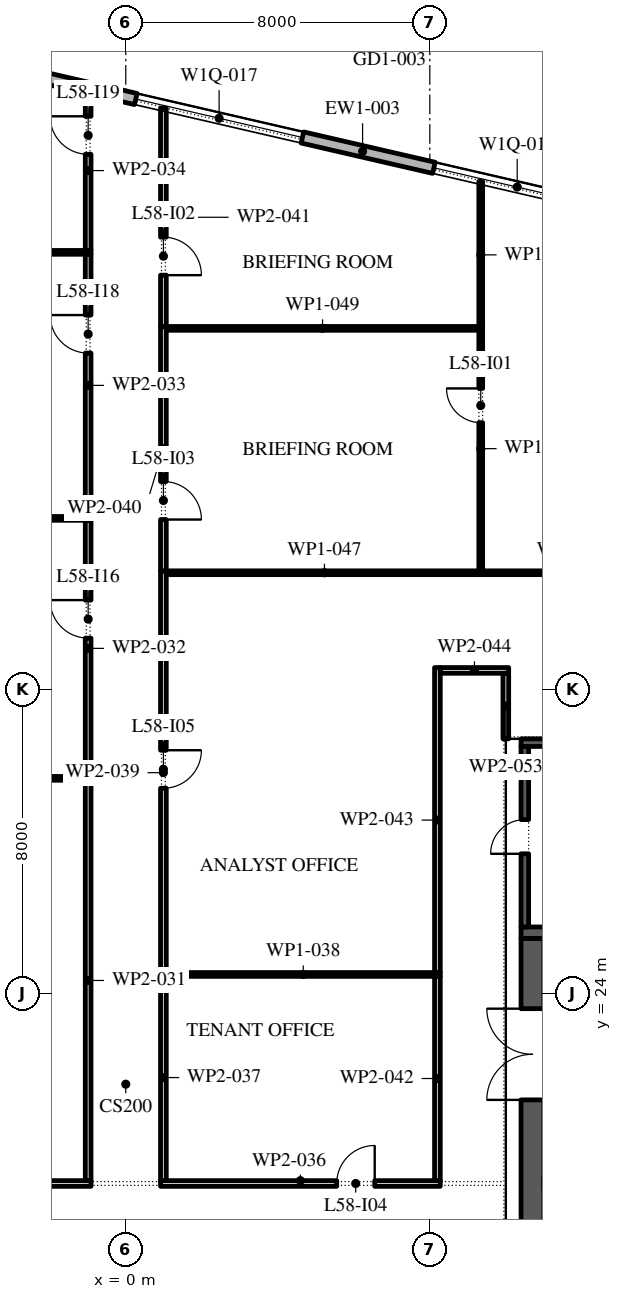
"""IFC4 building model, lengths in metres.
Left out: names, types, materials, properties, quantities, classifications, styles, units other than length and angle.
Written with IfcOpenShell. Run it as: python <this file> out.ifc"""

import sys

from ifc_helpers import new_model, si_unit, direction, frame, frame_2d, origin, place, context, subcontext, project, spatial, rectangle, extrude, element, fill, save


model = new_model("IFC4")
c1 = context("Model", 3, precision=1e-05, world=origin(), true_north=direction((0.0, 1.0)))
c2 = subcontext(c1, "Body", "Model", "MODEL_VIEW")
j1 = project(units=[si_unit("LENGTHUNIT", "METRE"), si_unit("PLANEANGLEUNIT", "RADIAN")], contexts=[c1])
p1 = place(None, origin())
s1 = spatial("IfcSite", under=j1, at=p1, CompositionType="ELEMENT")
p2 = place(p1, origin())
s2 = spatial("IfcBuilding", under=s1, at=p2, CompositionType="ELEMENT")
p3 = place(p2, frame((0.0, 0.0, 268.2)))
s3 = spatial("IfcBuildingStorey", under=s2, at=p3, CompositionType="ELEMENT", Elevation=268.2)
p4 = place(p3, frame((29.616, 40.758, 0.0), z_axis=(0.0, 0.0, 1.0), x_axis=(-0.974370532314, 0.224949029246, 0.0)))
e1 = element("IfcWall", 1, at=p4, inside=s3, PredefinedType="STANDARD", context=c2, shape_type="SweptSolid", body=[
    extrude(rectangle(XDim=48.0, YDim=0.3, at=frame_2d((24.0, 0.0))), origin(), (0.0, 0.0, 1.0), 4.0),
])
p5 = place(p4, frame((1.625, 0.0, 0.45)))
e2 = element("IfcOpeningElement", 2, at=p5, cuts=e1, PredefinedType="OPENING", context=c2, shape_type="SweptSolid", body=[
    extrude(rectangle(XDim=4.5, YDim=2.575, at=frame_2d((2.25, 1.288))), frame((0.0, 0.16, 0.0), z_axis=(0.0, -1.0, 0.0), x_axis=(1.0, 0.0, 0.0)), (0.0, 0.0, 1.0), 0.32),
])
p6 = place(p4, frame((10.575, 0.0, 0.0)))
e3 = element("IfcOpeningElement", 3, at=p6, cuts=e1, PredefinedType="OPENING", context=c2, shape_type="SweptSolid", body=[
    extrude(rectangle(XDim=2.4, YDim=3.5, at=frame_2d((1.2, 1.75))), frame((0.0, 0.16, 0.0), z_axis=(0.0, -1.0, 0.0), x_axis=(1.0, 0.0, 0.0)), (0.0, 0.0, 1.0), 0.32),
])
p7 = place(p4, frame((17.575, 0.0, 0.45)))
e4 = element("IfcOpeningElement", 4, at=p7, cuts=e1, PredefinedType="OPENING", context=c2, shape_type="SweptSolid", body=[
    extrude(rectangle(XDim=4.5, YDim=2.45, at=frame_2d((2.25, 1.225))), frame((0.0, 0.16, 0.0), z_axis=(0.0, -1.0, 0.0), x_axis=(1.0, 0.0, 0.0)), (0.0, 0.0, 1.0), 0.32),
])
p8 = place(p4, frame((25.625, 0.0, 0.45)))
e5 = element("IfcOpeningElement", 5, at=p8, cuts=e1, PredefinedType="OPENING", context=c2, shape_type="SweptSolid", body=[
    extrude(rectangle(XDim=4.5, YDim=2.45, at=frame_2d((2.25, 1.225))), frame((0.0, 0.16, 0.0), z_axis=(0.0, -1.0, 0.0), x_axis=(1.0, 0.0, 0.0)), (0.0, 0.0, 1.0), 0.32),
])
p9 = place(p4, frame((33.675, 0.0, 0.45)))
e6 = element("IfcOpeningElement", 6, at=p9, cuts=e1, PredefinedType="OPENING", context=c2, shape_type="SweptSolid", body=[
    extrude(rectangle(XDim=4.5, YDim=2.45, at=frame_2d((2.25, 1.225))), frame((0.0, 0.16, 0.0), z_axis=(0.0, -1.0, 0.0), x_axis=(1.0, 0.0, 0.0)), (0.0, 0.0, 1.0), 0.32),
])
p10 = place(p4, frame((42.175, 0.0, 0.0)))
e7 = element("IfcOpeningElement", 7, at=p10, cuts=e1, PredefinedType="OPENING", context=c2, shape_type="SweptSolid", body=[
    extrude(rectangle(XDim=2.4, YDim=3.5, at=frame_2d((1.2, 1.75))), frame((0.0, 0.16, 0.0), z_axis=(0.0, -1.0, 0.0), x_axis=(1.0, 0.0, 0.0)), (0.0, 0.0, 1.0), 0.32),
])
p11 = place(p3, frame((10.7, -2.45, 0.0), z_axis=(0.0, 0.0, 1.0), x_axis=(0.0, 1.0, 0.0)))
e8 = element("IfcWall", 8, at=p11, inside=s3, PredefinedType="SHEAR", context=c2, shape_type="SweptSolid", body=[
    extrude(rectangle(XDim=27.9, YDim=0.6, at=frame_2d((13.95, 0.0))), origin(), (0.0, 0.0, 1.0), 4.0),
])
p12 = place(p11, frame((23.65, 0.0, 0.0)))
e9 = element("IfcOpeningElement", 9, at=p12, cuts=e8, PredefinedType="OPENING", context=c2, shape_type="SweptSolid", body=[
    extrude(rectangle(XDim=2.4, YDim=2.1, at=frame_2d((1.2, 1.05))), frame((0.0, 0.31, 0.0), z_axis=(0.0, -1.0, 0.0), x_axis=(1.0, 0.0, 0.0)), (0.0, 0.0, 1.0), 0.62),
])
p13 = place(p11, frame((1.087, 0.0, 0.0)))
e10 = element("IfcOpeningElement", 10, at=p13, cuts=e8, PredefinedType="OPENING", context=c2, shape_type="SweptSolid", body=[
    extrude(rectangle(XDim=0.9, YDim=2.1, at=frame_2d((0.45, 1.05))), frame((0.0, 0.31, 0.0), z_axis=(0.0, -1.0, 0.0), x_axis=(1.0, 0.0, 0.0)), (0.0, 0.0, 1.0), 0.62),
])
p14 = place(p11, frame((4.262, 0.0, 0.0)))
e11 = element("IfcOpeningElement", 11, at=p14, cuts=e8, PredefinedType="OPENING", context=c2, shape_type="SweptSolid", body=[
    extrude(rectangle(XDim=1.0, YDim=2.1, at=frame_2d((0.5, 1.05))), frame((0.0, 0.31, 0.0), z_axis=(0.0, -1.0, 0.0), x_axis=(1.0, 0.0, 0.0)), (0.0, 0.0, 1.0), 0.62),
])
p15 = place(p3, frame((10.4, 25.6, 0.0), z_axis=(0.0, 0.0, 1.0), x_axis=(1.0, 0.0, 0.0)))
e12 = element("IfcWall", 12, at=p15, inside=s3, PredefinedType="SHEAR", context=c2, shape_type="SweptSolid", body=[
    extrude(rectangle(XDim=11.2, YDim=0.3, at=frame_2d((5.6, 0.0))), origin(), (0.0, 0.0, 1.0), 4.0),
])
p16 = place(p3, frame((10.5, 25.75, 0.0), z_axis=(0.0, 0.0, 1.0), x_axis=(0.0, 1.0, 0.0)))
e13 = element("IfcWall", 13, at=p16, inside=s3, PredefinedType="SHEAR", context=c2, shape_type="SweptSolid", body=[
    extrude(rectangle(XDim=4.75, YDim=0.2, at=frame_2d((2.375, 0.0))), origin(), (0.0, 0.0, 1.0), 4.0),
])
p17 = place(p16, frame((1.925, 0.0, 0.0)))
e14 = element("IfcOpeningElement", 14, at=p17, cuts=e13, PredefinedType="OPENING", context=c2, shape_type="SweptSolid", body=[
    extrude(rectangle(XDim=0.9, YDim=2.1, at=frame_2d((0.45, 1.05))), frame((0.0, 0.11, 0.0), z_axis=(0.0, -1.0, 0.0), x_axis=(1.0, 0.0, 0.0)), (0.0, 0.0, 1.0), 0.22),
])
p18 = place(p3, frame((10.4, 30.6, 0.0), z_axis=(0.0, 0.0, 1.0), x_axis=(1.0, 0.0, 0.0)))
e15 = element("IfcWall", 15, at=p18, inside=s3, PredefinedType="SHEAR", context=c2, shape_type="SweptSolid", body=[
    extrude(rectangle(XDim=11.2, YDim=0.2, at=frame_2d((5.6, 0.0))), origin(), (0.0, 0.0, 1.0), 4.0),
])
p19 = place(p3, frame((-8.275, 19.0, 0.0), z_axis=(0.0, 0.0, 1.0), x_axis=(1.0, 0.0, 0.0)))
e16 = element("IfcWall", 16, at=p19, inside=s3, PredefinedType="PARTITIONING", context=c2, shape_type="SweptSolid", body=[
    extrude(rectangle(XDim=7.36, YDim=0.15, at=frame_2d((3.68, 0.0))), origin(), (0.0, 0.0, 1.0), 4.0),
])
p20 = place(p3, frame((-8.125, 29.66, 0.0), z_axis=(0.0, 0.0, 1.0), x_axis=(1.0, 0.0, 0.0)))
e17 = element("IfcWall", 17, at=p20, inside=s3, PredefinedType="PARTITIONING", context=c2, shape_type="SweptSolid", body=[
    extrude(rectangle(XDim=7.21, YDim=0.1, at=frame_2d((3.605, 0.0))), origin(), (0.0, 0.0, 1.0), 4.0),
])
p21 = place(p3, frame((-5.95, 36.5, 0.0), z_axis=(0.0, 0.0, 1.0), x_axis=(1.0, 0.0, 0.0)))
e18 = element("IfcWall", 18, at=p21, inside=s3, PredefinedType="PARTITIONING", context=c2, shape_type="SweptSolid", body=[
    extrude(rectangle(XDim=5.035, YDim=0.1, at=frame_2d((2.518, 0.0))), origin(), (0.0, 0.0, 1.0), 4.0),
])
p22 = place(p3, frame((-6.0, 43.5, 0.0), z_axis=(0.0, 0.0, 1.0), x_axis=(1.0, 0.0, 0.0)))
e19 = element("IfcWall", 19, at=p22, inside=s3, PredefinedType="PARTITIONING", context=c2, shape_type="SweptSolid", body=[
    extrude(rectangle(XDim=5.085, YDim=0.1, at=frame_2d((2.542, 0.0))), origin(), (0.0, 0.0, 1.0), 4.0),
])
p23 = place(p3, frame((-0.99, 19.075, 0.0), z_axis=(0.0, 0.0, 1.0), x_axis=(0.0, 1.0, 0.0)))
e20 = element("IfcWall", 20, at=p23, inside=s3, PredefinedType="PARTITIONING", context=c2, shape_type="SweptSolid", body=[
    extrude(rectangle(XDim=10.535, YDim=0.15, at=frame_2d((5.268, 0.0))), origin(), (0.0, 0.0, 1.0), 4.0),
])
p24 = place(p3, frame((-0.99, 29.71, 0.0), z_axis=(0.0, 0.0, 1.0), x_axis=(0.0, 1.0, 0.0)))
e21 = element("IfcWall", 21, at=p24, inside=s3, PredefinedType="PARTITIONING", context=c2, shape_type="SweptSolid", body=[
    extrude(rectangle(XDim=6.74, YDim=0.15, at=frame_2d((3.37, 0.0))), origin(), (0.0, 0.0, 1.0), 4.0),
])
p25 = place(p24, frame((3.64, 0.0, 0.0)))
e22 = element("IfcOpeningElement", 22, at=p25, cuts=e21, PredefinedType="OPENING", context=c2, shape_type="SweptSolid", body=[
    extrude(rectangle(XDim=1.0, YDim=2.1, at=frame_2d((0.5, 1.05))), frame((0.0, 0.085, 0.0), z_axis=(0.0, -1.0, 0.0), x_axis=(1.0, 0.0, 0.0)), (0.0, 0.0, 1.0), 0.17),
])
p26 = place(p3, frame((-0.99, 36.55, 0.0), z_axis=(0.0, 0.0, 1.0), x_axis=(0.0, 1.0, 0.0)))
e23 = element("IfcWall", 23, at=p26, inside=s3, PredefinedType="PARTITIONING", context=c2, shape_type="SweptSolid", body=[
    extrude(rectangle(XDim=6.9, YDim=0.15, at=frame_2d((3.45, 0.0))), origin(), (0.0, 0.0, 1.0), 4.0),
])
p27 = place(p26, frame((4.3, 0.0, 0.0)))
e24 = element("IfcOpeningElement", 24, at=p27, cuts=e23, PredefinedType="OPENING", context=c2, shape_type="SweptSolid", body=[
    extrude(rectangle(XDim=1.0, YDim=2.1, at=frame_2d((0.5, 1.05))), frame((0.0, 0.085, 0.0), z_axis=(0.0, -1.0, 0.0), x_axis=(1.0, 0.0, 0.0)), (0.0, 0.0, 1.0), 0.17),
])
p28 = place(p3, frame((-0.99, 43.55, 0.0), z_axis=(0.0, 0.0, 1.0), x_axis=(0.0, 1.0, 0.0)))
e25 = element("IfcWall", 25, at=p28, inside=s3, PredefinedType="PARTITIONING", context=c2, shape_type="SweptSolid", body=[
    extrude(rectangle(XDim=4.203, YDim=0.15, at=frame_2d((2.102, 0.0))), origin(), (0.0, 0.0, 1.0), 4.0),
])
p29 = place(p28, frame((2.53, 0.0, 0.0)))
e26 = element("IfcOpeningElement", 26, at=p29, cuts=e25, PredefinedType="OPENING", context=c2, shape_type="SweptSolid", body=[
    extrude(rectangle(XDim=1.0, YDim=2.1, at=frame_2d((0.5, 1.05))), frame((0.0, 0.085, 0.0), z_axis=(0.0, -1.0, 0.0), x_axis=(1.0, 0.0, 0.0)), (0.0, 0.0, 1.0), 0.17),
])
p30 = place(p3, frame((0.915, 19.0, 0.0), z_axis=(0.0, 0.0, 1.0), x_axis=(1.0, 0.0, 0.0)))
e27 = element("IfcWall", 27, at=p30, inside=s3, PredefinedType="PARTITIONING", context=c2, shape_type="SweptSolid", body=[
    extrude(rectangle(XDim=7.36, YDim=0.15, at=frame_2d((3.68, 0.0))), origin(), (0.0, 0.0, 1.0), 4.0),
])
p31 = place(p30, frame((4.635, 0.0, 0.0)))
e28 = element("IfcOpeningElement", 28, at=p31, cuts=e27, PredefinedType="OPENING", context=c2, shape_type="SweptSolid", body=[
    extrude(rectangle(XDim=1.0, YDim=2.1, at=frame_2d((0.5, 1.05))), frame((0.0, 0.085, 0.0), z_axis=(0.0, -1.0, 0.0), x_axis=(1.0, 0.0, 0.0)), (0.0, 0.0, 1.0), 0.17),
])
p32 = place(p3, frame((0.99, 24.5, 0.0), z_axis=(0.0, 0.0, 1.0), x_axis=(0.0, -1.0, 0.0)))
e29 = element("IfcWall", 29, at=p32, inside=s3, PredefinedType="PARTITIONING", context=c2, shape_type="SweptSolid", body=[
    extrude(rectangle(XDim=5.425, YDim=0.15, at=frame_2d((2.712, 0.0))), origin(), (0.0, 0.0, 1.0), 4.0),
])
p33 = place(p3, frame((1.065, 24.5, 0.0), z_axis=(0.0, 0.0, 1.0), x_axis=(1.0, 0.0, 0.0)))
e30 = element("IfcWall", 30, at=p33, inside=s3, PredefinedType="PARTITIONING", context=c2, shape_type="SweptSolid", body=[
    extrude(rectangle(XDim=7.21, YDim=0.1, at=frame_2d((3.605, 0.0))), origin(), (0.0, 0.0, 1.0), 4.0),
])
p34 = place(p3, frame((0.99, 35.12, 0.0), z_axis=(0.0, 0.0, 1.0), x_axis=(0.0, -1.0, 0.0)))
e31 = element("IfcWall", 31, at=p34, inside=s3, PredefinedType="PARTITIONING", context=c2, shape_type="SweptSolid", body=[
    extrude(rectangle(XDim=10.62, YDim=0.15, at=frame_2d((5.31, 0.0))), origin(), (0.0, 0.0, 1.0), 4.0),
])
p35 = place(p34, frame((4.72, 0.0, 0.0)))
e32 = element("IfcOpeningElement", 32, at=p35, cuts=e31, PredefinedType="OPENING", context=c2, shape_type="SweptSolid", body=[
    extrude(rectangle(XDim=1.0, YDim=2.1, at=frame_2d((0.5, 1.05))), frame((0.0, 0.085, 0.0), z_axis=(0.0, -1.0, 0.0), x_axis=(1.0, 0.0, 0.0)), (0.0, 0.0, 1.0), 0.17),
])
p36 = place(p3, frame((0.99, 41.55, 0.0), z_axis=(0.0, 0.0, 1.0), x_axis=(0.0, -1.0, 0.0)))
e33 = element("IfcWall", 33, at=p36, inside=s3, PredefinedType="PARTITIONING", context=c2, shape_type="SweptSolid", body=[
    extrude(rectangle(XDim=6.43, YDim=0.15, at=frame_2d((3.215, 0.0))), origin(), (0.0, 0.0, 1.0), 4.0),
])
p37 = place(p36, frame((4.08, 0.0, 0.0)))
e34 = element("IfcOpeningElement", 34, at=p37, cuts=e33, PredefinedType="OPENING", context=c2, shape_type="SweptSolid", body=[
    extrude(rectangle(XDim=1.0, YDim=2.1, at=frame_2d((0.5, 1.05))), frame((0.0, 0.085, 0.0), z_axis=(0.0, -1.0, 0.0), x_axis=(1.0, 0.0, 0.0)), (0.0, 0.0, 1.0), 0.17),
])
p38 = place(p3, frame((0.99, 47.296, 0.0), z_axis=(0.0, 0.0, 1.0), x_axis=(0.0, -1.0, 0.0)))
e35 = element("IfcWall", 35, at=p38, inside=s3, PredefinedType="PARTITIONING", context=c2, shape_type="SweptSolid", body=[
    extrude(rectangle(XDim=5.746, YDim=0.15, at=frame_2d((2.873, 0.0))), origin(), (0.0, 0.0, 1.0), 4.0),
])
p39 = place(p38, frame((3.396, 0.0, 0.0)))
e36 = element("IfcOpeningElement", 36, at=p39, cuts=e35, PredefinedType="OPENING", context=c2, shape_type="SweptSolid", body=[
    extrude(rectangle(XDim=1.0, YDim=2.1, at=frame_2d((0.5, 1.05))), frame((0.0, 0.085, 0.0), z_axis=(0.0, -1.0, 0.0), x_axis=(1.0, 0.0, 0.0)), (0.0, 0.0, 1.0), 0.17),
])
p40 = place(p3, frame((8.2, 19.075, 0.0), z_axis=(0.0, 0.0, 1.0), x_axis=(0.0, 1.0, 0.0)))
e37 = element("IfcWall", 37, at=p40, inside=s3, PredefinedType="PARTITIONING", context=c2, shape_type="SweptSolid", body=[
    extrude(rectangle(XDim=5.375, YDim=0.15, at=frame_2d((2.688, 0.0))), origin(), (0.0, 0.0, 1.0), 4.0),
])
p41 = place(p3, frame((8.2, 24.55, 0.0), z_axis=(0.0, 0.0, 1.0), x_axis=(0.0, 1.0, 0.0)))
e38 = element("IfcWall", 38, at=p41, inside=s3, PredefinedType="PARTITIONING", context=c2, shape_type="SweptSolid", body=[
    extrude(rectangle(XDim=8.025, YDim=0.15, at=frame_2d((4.012, 0.0))), origin(), (0.0, 0.0, 1.0), 4.0),
])
p42 = place(p3, frame((8.275, 32.5, 0.0), z_axis=(0.0, 0.0, 1.0), x_axis=(1.0, 0.0, 0.0)))
e39 = element("IfcWall", 39, at=p42, inside=s3, PredefinedType="PARTITIONING", context=c2, shape_type="SweptSolid", body=[
    extrude(rectangle(XDim=1.8, YDim=0.15, at=frame_2d((0.9, 0.0))), origin(), (0.0, 0.0, 1.0), 4.0),
])
p43 = place(p3, frame((9.39, 35.07, 0.0), z_axis=(0.0, 0.0, 1.0), x_axis=(-1.0, 0.0, 0.0)))
e40 = element("IfcWall", 40, at=p43, inside=s3, PredefinedType="PARTITIONING", context=c2, shape_type="SweptSolid", body=[
    extrude(rectangle(XDim=8.325, YDim=0.1, at=frame_2d((4.163, 0.0))), origin(), (0.0, 0.0, 1.0), 4.0),
])
p44 = place(p3, frame((9.34, 35.12, 0.0), z_axis=(0.0, 0.0, 1.0), x_axis=(0.0, 1.0, 0.0)))
e41 = element("IfcWall", 41, at=p44, inside=s3, PredefinedType="PARTITIONING", context=c2, shape_type="SweptSolid", body=[
    extrude(rectangle(XDim=6.43, YDim=0.1, at=frame_2d((3.215, 0.0))), origin(), (0.0, 0.0, 1.0), 4.0),
])
p45 = place(p44, frame((3.9, 0.0, 0.0)))
e42 = element("IfcOpeningElement", 42, at=p45, cuts=e41, PredefinedType="OPENING", context=c2, shape_type="SweptSolid", body=[
    extrude(rectangle(XDim=0.9, YDim=2.1, at=frame_2d((0.45, 1.05))), frame((0.0, 0.06, 0.0), z_axis=(0.0, -1.0, 0.0), x_axis=(1.0, 0.0, 0.0)), (0.0, 0.0, 1.0), 0.12),
])
p46 = place(p3, frame((9.29, 41.5, 0.0), z_axis=(0.0, 0.0, 1.0), x_axis=(-1.0, 0.0, 0.0)))
e43 = element("IfcWall", 43, at=p46, inside=s3, PredefinedType="PARTITIONING", context=c2, shape_type="SweptSolid", body=[
    extrude(rectangle(XDim=8.225, YDim=0.1, at=frame_2d((4.113, 0.0))), origin(), (0.0, 0.0, 1.0), 4.0),
])
p47 = place(p3, frame((9.34, 41.5, 0.0), z_axis=(0.0, 0.0, 1.0), x_axis=(0.0, 1.0, 0.0)))
e44 = element("IfcWall", 44, at=p47, inside=s3, PredefinedType="PARTITIONING", context=c2, shape_type="SweptSolid", body=[
    extrude(rectangle(XDim=3.868, YDim=0.1, at=frame_2d((1.934, 0.0))), origin(), (0.0, 0.0, 1.0), 4.0),
])
p48 = place(p3, frame((10.0, 32.425, 0.0), z_axis=(0.0, 0.0, 1.0), x_axis=(0.0, -1.0, 0.0)))
e45 = element("IfcWall", 45, at=p48, inside=s3, PredefinedType="PARTITIONING", context=c2, shape_type="SweptSolid", body=[
    extrude(rectangle(XDim=1.725, YDim=0.15, at=frame_2d((0.863, 0.0))), origin(), (0.0, 0.0, 1.0), 4.0),
])
p49 = place(p3, frame((14.19, 35.07, 0.0), z_axis=(0.0, 0.0, 1.0), x_axis=(-1.0, 0.0, 0.0)))
e46 = element("IfcWall", 46, at=p49, inside=s3, PredefinedType="PARTITIONING", context=c2, shape_type="SweptSolid", body=[
    extrude(rectangle(XDim=4.8, YDim=0.1, at=frame_2d((2.4, 0.0))), origin(), (0.0, 0.0, 1.0), 4.0),
])
p50 = place(p7, origin())
e47 = element("IfcWindow", 47, at=p50, inside=s3, PartitioningType="DOUBLE_PANEL_VERTICAL", PredefinedType="WINDOW", context=c2, shape_type="SweptSolid", body=[
    extrude(rectangle(XDim=4.5, YDim=2.45, at=frame_2d((2.25, 1.225))), frame((0.0, 0.03, 0.0), z_axis=(0.0, -1.0, 0.0), x_axis=(1.0, 0.0, 0.0)), (0.0, 0.0, 1.0), 0.06),
])
fill(e4, e47)
p51 = place(p8, origin())
e48 = element("IfcWindow", 48, at=p51, inside=s3, PartitioningType="DOUBLE_PANEL_VERTICAL", PredefinedType="WINDOW", context=c2, shape_type="SweptSolid", body=[
    extrude(rectangle(XDim=4.5, YDim=2.45, at=frame_2d((2.25, 1.225))), frame((0.0, 0.03, 0.0), z_axis=(0.0, -1.0, 0.0), x_axis=(1.0, 0.0, 0.0)), (0.0, 0.0, 1.0), 0.06),
])
fill(e5, e48)
p52 = place(p12, origin())
e49 = element("IfcDoor", 49, at=p52, inside=s3, OperationType="DOUBLE_DOOR_SINGLE_SWING", PredefinedType="DOOR", context=c2, shape_type="SweptSolid", body=[
    extrude(rectangle(XDim=2.4, YDim=2.1, at=frame_2d((1.2, 1.05))), frame((0.0, 0.025, 0.0), z_axis=(0.0, -1.0, 0.0), x_axis=(1.0, 0.0, 0.0)), (0.0, 0.0, 1.0), 0.05),
])
fill(e9, e49)
p53 = place(p17, origin())
e50 = element("IfcDoor", 50, at=p53, inside=s3, OperationType="SINGLE_SWING_RIGHT", PredefinedType="DOOR", context=c2, shape_type="SweptSolid", body=[
    extrude(rectangle(XDim=0.9, YDim=2.1, at=frame_2d((0.45, 1.05))), frame((0.0, -0.05, 0.0), z_axis=(0.0, -1.0, 0.0), x_axis=(1.0, 0.0, 0.0)), (0.0, 0.0, 1.0), 0.05),
])
fill(e14, e50)
p54 = place(p45, origin())
e51 = element("IfcDoor", 51, at=p54, inside=s3, OperationType="SINGLE_SWING_LEFT", PredefinedType="DOOR", context=c2, shape_type="SweptSolid", body=[
    extrude(rectangle(XDim=0.9, YDim=2.1, at=frame_2d((0.45, 1.05))), frame((0.0, 0.025, 0.0), z_axis=(0.0, -1.0, 0.0), x_axis=(1.0, 0.0, 0.0)), (0.0, 0.0, 1.0), 0.05),
])
fill(e42, e51)
p55 = place(p39, origin())
e52 = element("IfcDoor", 52, at=p55, inside=s3, OperationType="SINGLE_SWING_LEFT", PredefinedType="DOOR", context=c2, shape_type="SweptSolid", body=[
    extrude(rectangle(XDim=1.0, YDim=2.1, at=frame_2d((0.5, 1.05))), frame((0.0, 0.025, 0.0), z_axis=(0.0, -1.0, 0.0), x_axis=(1.0, 0.0, 0.0)), (0.0, 0.0, 1.0), 0.05),
])
fill(e36, e52)
p56 = place(p37, origin())
e53 = element("IfcDoor", 53, at=p56, inside=s3, OperationType="SINGLE_SWING_LEFT", PredefinedType="DOOR", context=c2, shape_type="SweptSolid", body=[
    extrude(rectangle(XDim=1.0, YDim=2.1, at=frame_2d((0.5, 1.05))), frame((0.0, 0.025, 0.0), z_axis=(0.0, -1.0, 0.0), x_axis=(1.0, 0.0, 0.0)), (0.0, 0.0, 1.0), 0.05),
])
fill(e34, e53)
p57 = place(p31, origin())
e54 = element("IfcDoor", 54, at=p57, inside=s3, OperationType="SINGLE_SWING_LEFT", PredefinedType="DOOR", context=c2, shape_type="SweptSolid", body=[
    extrude(rectangle(XDim=1.0, YDim=2.1, at=frame_2d((0.5, 1.05))), frame((0.0, 0.025, 0.0), z_axis=(0.0, -1.0, 0.0), x_axis=(1.0, 0.0, 0.0)), (0.0, 0.0, 1.0), 0.05),
])
fill(e28, e54)
p58 = place(p35, origin())
e55 = element("IfcDoor", 55, at=p58, inside=s3, OperationType="SINGLE_SWING_RIGHT", PredefinedType="DOOR", context=c2, shape_type="SweptSolid", body=[
    extrude(rectangle(XDim=1.0, YDim=2.1, at=frame_2d((0.5, 1.05))), frame((0.0, 0.025, 0.0), z_axis=(0.0, -1.0, 0.0), x_axis=(1.0, 0.0, 0.0)), (0.0, 0.0, 1.0), 0.05),
])
fill(e32, e55)
p59 = place(p25, origin())
e56 = element("IfcDoor", 56, at=p59, inside=s3, OperationType="SINGLE_SWING_LEFT", PredefinedType="DOOR", context=c2, shape_type="SweptSolid", body=[
    extrude(rectangle(XDim=1.0, YDim=2.1, at=frame_2d((0.5, 1.05))), frame((0.0, 0.025, 0.0), z_axis=(0.0, -1.0, 0.0), x_axis=(1.0, 0.0, 0.0)), (0.0, 0.0, 1.0), 0.05),
])
fill(e22, e56)
p60 = place(p27, origin())
e57 = element("IfcDoor", 57, at=p60, inside=s3, OperationType="SINGLE_SWING_LEFT", PredefinedType="DOOR", context=c2, shape_type="SweptSolid", body=[
    extrude(rectangle(XDim=1.0, YDim=2.1, at=frame_2d((0.5, 1.05))), frame((0.0, 0.025, 0.0), z_axis=(0.0, -1.0, 0.0), x_axis=(1.0, 0.0, 0.0)), (0.0, 0.0, 1.0), 0.05),
])
fill(e24, e57)
p61 = place(p29, origin())
e58 = element("IfcDoor", 58, at=p61, inside=s3, OperationType="SINGLE_SWING_LEFT", PredefinedType="DOOR", context=c2, shape_type="SweptSolid", body=[
    extrude(rectangle(XDim=1.0, YDim=2.1, at=frame_2d((0.5, 1.05))), frame((0.0, 0.025, 0.0), z_axis=(0.0, -1.0, 0.0), x_axis=(1.0, 0.0, 0.0)), (0.0, 0.0, 1.0), 0.05),
])
fill(e26, e58)
save(model, sys.argv[1])
